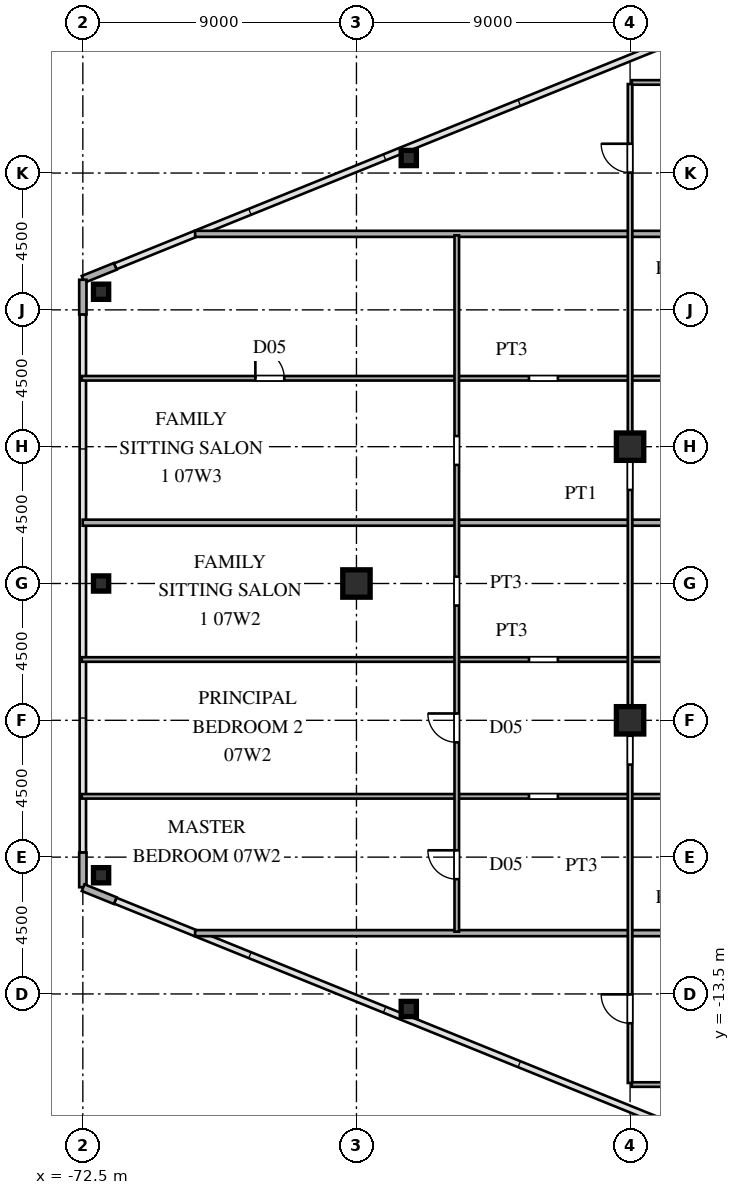
"""IFC4 building model, lengths in metres.
Left out: names, types, materials, properties, quantities, classifications, styles, units other than length and angle.
Written with IfcOpenShell. Run it as: python <this file> out.ifc"""

import sys

from ifc_helpers import new_model, si_unit, direction, frame, frame_2d, origin, origin_2d, place, context, subcontext, project, spatial, rectangle, hollow_rectangle, i_section, extrude, source, transform, mapped, element, fill, save


model = new_model("IFC4")
c1 = context("Model", 3, precision=1e-05, world=origin(), true_north=direction((0.0, 1.0)))
c2 = subcontext(c1, "Body", "Model", "MODEL_VIEW")
j1 = project(units=[si_unit("LENGTHUNIT", "METRE"), si_unit("PLANEANGLEUNIT", "RADIAN")], contexts=[c1])
p1 = place(None, origin())
s1 = spatial("IfcSite", under=j1, at=p1, CompositionType="ELEMENT")
p2 = place(p1, origin())
s2 = spatial("IfcBuilding", under=s1, at=p2, CompositionType="ELEMENT")
p3 = place(p2, frame((0.0, 0.0, 29.7)))
s3 = spatial("IfcBuildingStorey", under=s2, at=p3, CompositionType="ELEMENT", Elevation=29.7)
m1 = source(origin(), c2, "Body", "SweptSolid", [
    extrude(i_section(OverallWidth=0.9, OverallDepth=0.9, WebThickness=0.036, FlangeThickness=0.055, at=origin_2d()), origin(), (0.0, 0.0, 1.0), 3.6),
])
for number, where, z_axis, x_axis in (
    (1, (-54.5, -4.5, 0.0), (0.0, 0.0, 1.0), (1.0, 0.0, 0.0)),
    (2, (-54.5, 4.5, 0.0), (0.0, 0.0, 1.0), (1.0, 0.0, 0.0)),
    (3, (-63.5, 0.0, 0.0), (0.0, 0.0, 1.0), (1.0, 0.0, 0.0)),
):
    element("IfcColumn", number, at=place(p3, frame(where, z_axis=z_axis, x_axis=x_axis)), inside=s3, PredefinedType="COLUMN", context=c2, shape_type="MappedRepresentation", body=[
        mapped(m1, transform((0.0, 0.0, 0.0), scale=1.0)),
    ])
m2 = source(origin(), c2, "Body", "SweptSolid", [
    extrude(hollow_rectangle(XDim=0.5, YDim=0.5, WallThickness=0.02, at=origin_2d()), origin(), (0.0, 0.0, 1.0), 3.6),
])
for number, where, z_axis, x_axis in (
    (4, (-71.9, 9.596, 0.0), (0.0, 0.0, 1.0), (1.0, 0.0, 0.0)),
    (5, (-71.9, -9.596, 0.0), (0.0, 0.0, 1.0), (1.0, 0.0, 0.0)),
    (6, (-61.779, -13.994, 0.0), (0.0, 0.0, 1.0), (1.0, 0.0, 0.0)),
    (7, (-61.779, 13.994, 0.0), (0.0, 0.0, 1.0), (1.0, 0.0, 0.0)),
    (8, (-71.9, 0.0, 0.0), (0.0, 0.0, 1.0), (1.0, 0.0, 0.0)),
):
    element("IfcColumn", number, at=place(p3, frame(where, z_axis=z_axis, x_axis=x_axis)), inside=s3, PredefinedType="COLUMN", context=c2, shape_type="MappedRepresentation", body=[
        mapped(m2, transform((0.0, 0.0, 0.0), scale=1.0)),
    ])
for number, where, z_axis, x_axis in (
    (9, (-71.434, 10.431, 0.0), (0.0, 0.0, 1.0), (-0.927, -0.375, 0.0)),
    (10, (-72.5, 9.99, 0.0), (0.0, 0.0, 1.0), (0.0, -1.0, 0.0)),
    (11, (-72.5, -8.85, 0.0), (0.0, 0.0, 1.0), (0.0, -1.0, 0.0)),
    (12, (-72.491, -10.004, 0.0), (0.0, 0.0, 1.0), (0.927, -0.375, 0.0)),
):
    element("IfcWall", number, at=place(p3, frame(where, z_axis=z_axis, x_axis=x_axis)), inside=s3, PredefinedType="SOLIDWALL", context=c2, shape_type="SweptSolid", body=[
        extrude(rectangle(XDim=1.14, YDim=0.24, at=frame_2d((0.57, 0.0))), origin(), (0.0, 0.0, 1.0), 3.38),
    ])
p4 = place(p3, frame((-54.45, -16.48, 0.0), z_axis=(0.0, 0.0, 1.0), x_axis=(1.0, 0.0, 0.0)))
e13 = element("IfcWall", 13, at=p4, inside=s3, PredefinedType="PARTITIONING", context=c2, shape_type="SweptSolid", body=[
    extrude(rectangle(XDim=10.2, YDim=0.15, at=frame_2d((5.1, 0.0))), origin(), (0.0, 0.0, 1.0), 3.38),
])
p5 = place(p4, frame((4.625, 0.0, 0.0)))
e14 = element("IfcOpeningElement", 14, at=p5, cuts=e13, PredefinedType="OPENING", context=c2, shape_type="SweptSolid", body=[
    extrude(rectangle(XDim=0.95, YDim=2.15, at=frame_2d((0.475, 1.075))), frame((0.0, 0.085, 0.0), z_axis=(0.0, -1.0, 0.0), x_axis=(1.0, 0.0, 0.0)), (0.0, 0.0, 1.0), 0.17),
])
p6 = place(p3, frame((-68.807, -11.5, 0.0), z_axis=(0.0, 0.0, 1.0), x_axis=(1.0, 0.0, 0.0)))
e15 = element("IfcWall", 15, at=p6, inside=s3, PredefinedType="PARTITIONING", context=c2, shape_type="SweptSolid", body=[
    extrude(rectangle(XDim=29.077, YDim=0.2, at=frame_2d((14.539, 0.0))), origin(), (0.0, 0.0, 1.0), 3.38),
])
p7 = place(p3, frame((-72.535, -7.0, 0.0), z_axis=(0.0, 0.0, 1.0), x_axis=(1.0, 0.0, 0.0)))
e16 = element("IfcWall", 16, at=p7, inside=s3, PredefinedType="PARTITIONING", context=c2, shape_type="SweptSolid", body=[
    extrude(rectangle(XDim=28.285, YDim=0.15, at=frame_2d((14.143, 0.0))), origin(), (0.0, 0.0, 1.0), 3.38),
])
p8 = place(p7, frame((22.71, 0.0, 0.0)))
e17 = element("IfcOpeningElement", 17, at=p8, cuts=e16, PredefinedType="OPENING", context=c2, shape_type="SweptSolid", body=[
    extrude(rectangle(XDim=0.95, YDim=2.15, at=frame_2d((0.475, 1.075))), frame((0.0, 0.085, 0.0), z_axis=(0.0, -1.0, 0.0), x_axis=(1.0, 0.0, 0.0)), (0.0, 0.0, 1.0), 0.17),
])
p9 = place(p7, frame((14.71, 0.0, 0.0)))
e18 = element("IfcOpeningElement", 18, at=p9, cuts=e16, PredefinedType="OPENING", context=c2, shape_type="SweptSolid", body=[
    extrude(rectangle(XDim=0.95, YDim=2.15, at=frame_2d((0.475, 1.075))), frame((0.0, 0.085, 0.0), z_axis=(0.0, -1.0, 0.0), x_axis=(1.0, 0.0, 0.0)), (0.0, 0.0, 1.0), 0.17),
])
p10 = place(p3, frame((-72.535, -2.5, 0.0), z_axis=(0.0, 0.0, 1.0), x_axis=(1.0, 0.0, 0.0)))
e19 = element("IfcWall", 19, at=p10, inside=s3, PredefinedType="PARTITIONING", context=c2, shape_type="SweptSolid", body=[
    extrude(rectangle(XDim=28.285, YDim=0.15, at=frame_2d((14.143, 0.0))), origin(), (0.0, 0.0, 1.0), 3.38),
])
p11 = place(p10, frame((22.71, 0.0, 0.0)))
e20 = element("IfcOpeningElement", 20, at=p11, cuts=e19, PredefinedType="OPENING", context=c2, shape_type="SweptSolid", body=[
    extrude(rectangle(XDim=0.95, YDim=2.15, at=frame_2d((0.475, 1.075))), frame((0.0, 0.085, 0.0), z_axis=(0.0, -1.0, 0.0), x_axis=(1.0, 0.0, 0.0)), (0.0, 0.0, 1.0), 0.17),
])
p12 = place(p10, frame((14.71, 0.0, 0.0)))
e21 = element("IfcOpeningElement", 21, at=p12, cuts=e19, PredefinedType="OPENING", context=c2, shape_type="SweptSolid", body=[
    extrude(rectangle(XDim=0.95, YDim=2.15, at=frame_2d((0.475, 1.075))), frame((0.0, 0.085, 0.0), z_axis=(0.0, -1.0, 0.0), x_axis=(1.0, 0.0, 0.0)), (0.0, 0.0, 1.0), 0.17),
])
p13 = place(p3, frame((-72.505, 2.0, 0.0), z_axis=(0.0, 0.0, 1.0), x_axis=(1.0, 0.0, 0.0)))
e22 = element("IfcWall", 22, at=p13, inside=s3, PredefinedType="PARTITIONING", context=c2, shape_type="SweptSolid", body=[
    extrude(rectangle(XDim=32.775, YDim=0.2, at=frame_2d((16.387, 0.0))), origin(), (0.0, 0.0, 1.0), 3.38),
])
p14 = place(p3, frame((-72.535, 6.75, 0.0), z_axis=(0.0, 0.0, 1.0), x_axis=(1.0, 0.0, 0.0)))
e23 = element("IfcWall", 23, at=p14, inside=s3, PredefinedType="PARTITIONING", context=c2, shape_type="SweptSolid", body=[
    extrude(rectangle(XDim=28.285, YDim=0.15, at=frame_2d((14.143, 0.0))), origin(), (0.0, 0.0, 1.0), 3.38),
])
p15 = place(p14, frame((5.71, 0.0, 0.0)))
e24 = element("IfcOpeningElement", 24, at=p15, cuts=e23, PredefinedType="OPENING", context=c2, shape_type="SweptSolid", body=[
    extrude(rectangle(XDim=0.95, YDim=2.15, at=frame_2d((0.475, 1.075))), frame((0.0, 0.085, 0.0), z_axis=(0.0, -1.0, 0.0), x_axis=(1.0, 0.0, 0.0)), (0.0, 0.0, 1.0), 0.17),
])
p16 = place(p14, frame((14.71, 0.0, 0.0)))
e25 = element("IfcOpeningElement", 25, at=p16, cuts=e23, PredefinedType="OPENING", context=c2, shape_type="SweptSolid", body=[
    extrude(rectangle(XDim=0.95, YDim=2.15, at=frame_2d((0.475, 1.075))), frame((0.0, 0.085, 0.0), z_axis=(0.0, -1.0, 0.0), x_axis=(1.0, 0.0, 0.0)), (0.0, 0.0, 1.0), 0.17),
])
p17 = place(p3, frame((-68.807, 11.5, 0.0), z_axis=(0.0, 0.0, 1.0), x_axis=(1.0, 0.0, 0.0)))
e26 = element("IfcWall", 26, at=p17, inside=s3, PredefinedType="PARTITIONING", context=c2, shape_type="SweptSolid", body=[
    extrude(rectangle(XDim=29.077, YDim=0.2, at=frame_2d((14.539, 0.0))), origin(), (0.0, 0.0, 1.0), 3.38),
])
p18 = place(p3, frame((-54.45, 16.48, 0.0), z_axis=(0.0, 0.0, 1.0), x_axis=(1.0, 0.0, 0.0)))
e27 = element("IfcWall", 27, at=p18, inside=s3, PredefinedType="PARTITIONING", context=c2, shape_type="SweptSolid", body=[
    extrude(rectangle(XDim=10.2, YDim=0.15, at=frame_2d((5.1, 0.0))), origin(), (0.0, 0.0, 1.0), 3.38),
])
p19 = place(p18, frame((4.625, 0.0, 0.0)))
e28 = element("IfcOpeningElement", 28, at=p19, cuts=e27, PredefinedType="OPENING", context=c2, shape_type="SweptSolid", body=[
    extrude(rectangle(XDim=0.95, YDim=2.15, at=frame_2d((0.475, 1.075))), frame((0.0, 0.085, 0.0), z_axis=(0.0, -1.0, 0.0), x_axis=(1.0, 0.0, 0.0)), (0.0, 0.0, 1.0), 0.17),
])
p20 = place(p3, frame((-60.2, -11.45, 0.0), z_axis=(0.0, 0.0, 1.0), x_axis=(0.0, 1.0, 0.0)))
e29 = element("IfcWall", 29, at=p20, inside=s3, PredefinedType="PARTITIONING", context=c2, shape_type="SweptSolid", body=[
    extrude(rectangle(XDim=22.9, YDim=0.15, at=frame_2d((11.45, 0.0))), origin(), (0.0, 0.0, 1.0), 3.38),
])
p21 = place(p20, frame((1.725, 0.0, 0.0)))
e30 = element("IfcOpeningElement", 30, at=p21, cuts=e29, PredefinedType="OPENING", context=c2, shape_type="SweptSolid", body=[
    extrude(rectangle(XDim=0.95, YDim=2.15, at=frame_2d((0.475, 1.075))), frame((0.0, 0.085, 0.0), z_axis=(0.0, -1.0, 0.0), x_axis=(1.0, 0.0, 0.0)), (0.0, 0.0, 1.0), 0.17),
])
p22 = place(p20, frame((6.225, 0.0, 0.0)))
e31 = element("IfcOpeningElement", 31, at=p22, cuts=e29, PredefinedType="OPENING", context=c2, shape_type="SweptSolid", body=[
    extrude(rectangle(XDim=0.95, YDim=2.15, at=frame_2d((0.475, 1.075))), frame((0.0, 0.085, 0.0), z_axis=(0.0, -1.0, 0.0), x_axis=(1.0, 0.0, 0.0)), (0.0, 0.0, 1.0), 0.17),
])
p23 = place(p20, frame((10.725, 0.0, 0.0)))
e32 = element("IfcOpeningElement", 32, at=p23, cuts=e29, PredefinedType="OPENING", context=c2, shape_type="SweptSolid", body=[
    extrude(rectangle(XDim=0.95, YDim=2.15, at=frame_2d((0.475, 1.075))), frame((0.0, 0.085, 0.0), z_axis=(0.0, -1.0, 0.0), x_axis=(1.0, 0.0, 0.0)), (0.0, 0.0, 1.0), 0.17),
])
p24 = place(p20, frame((15.35, 0.0, 0.0)))
e33 = element("IfcOpeningElement", 33, at=p24, cuts=e29, PredefinedType="OPENING", context=c2, shape_type="SweptSolid", body=[
    extrude(rectangle(XDim=0.95, YDim=2.15, at=frame_2d((0.475, 1.075))), frame((0.0, 0.085, 0.0), z_axis=(0.0, -1.0, 0.0), x_axis=(1.0, 0.0, 0.0)), (0.0, 0.0, 1.0), 0.17),
])
p25 = place(p3, frame((-54.5, -16.427, 0.0), z_axis=(0.0, 0.0, 1.0), x_axis=(0.0, 1.0, 0.0)))
e34 = element("IfcWall", 34, at=p25, inside=s3, PredefinedType="PARTITIONING", context=c2, shape_type="SweptSolid", body=[
    extrude(rectangle(XDim=32.854, YDim=0.15, at=frame_2d((16.427, 0.0))), origin(), (0.0, 0.0, 1.0), 2.68),
])
p26 = place(p25, frame((1.963, 0.0, 0.0)))
e35 = element("IfcOpeningElement", 35, at=p26, cuts=e34, PredefinedType="OPENING", context=c2, shape_type="SweptSolid", body=[
    extrude(rectangle(XDim=0.95, YDim=2.15, at=frame_2d((0.475, 1.075))), frame((0.0, 0.085, 0.0), z_axis=(0.0, -1.0, 0.0), x_axis=(1.0, 0.0, 0.0)), (0.0, 0.0, 1.0), 0.17),
])
p27 = place(p25, frame((10.47, 0.0, 0.0)))
e36 = element("IfcOpeningElement", 36, at=p27, cuts=e34, PredefinedType="OPENING", context=c2, shape_type="SweptSolid", body=[
    extrude(rectangle(XDim=0.95, YDim=2.15, at=frame_2d((0.475, 1.075))), frame((0.0, 0.085, 0.0), z_axis=(0.0, -1.0, 0.0), x_axis=(1.0, 0.0, 0.0)), (0.0, 0.0, 1.0), 0.17),
])
p28 = place(p25, frame((19.504, 0.0, 0.0)))
e37 = element("IfcOpeningElement", 37, at=p28, cuts=e34, PredefinedType="OPENING", context=c2, shape_type="SweptSolid", body=[
    extrude(rectangle(XDim=0.95, YDim=2.15, at=frame_2d((0.475, 1.075))), frame((0.0, 0.085, 0.0), z_axis=(0.0, -1.0, 0.0), x_axis=(1.0, 0.0, 0.0)), (0.0, 0.0, 1.0), 0.17),
])
p29 = place(p25, frame((29.941, 0.0, 0.0)))
e38 = element("IfcOpeningElement", 38, at=p29, cuts=e34, PredefinedType="OPENING", context=c2, shape_type="SweptSolid", body=[
    extrude(rectangle(XDim=0.95, YDim=2.15, at=frame_2d((0.475, 1.075))), frame((0.0, 0.085, 0.0), z_axis=(0.0, -1.0, 0.0), x_axis=(1.0, 0.0, 0.0)), (0.0, 0.0, 1.0), 0.17),
])
m3 = source(origin(), c2, "Body", "SweptSolid", [
    extrude(rectangle(XDim=0.95, YDim=2.15, at=frame_2d((0.475, 1.075))), frame((0.0, 0.025, 0.0), z_axis=(0.0, -1.0, 0.0), x_axis=(1.0, 0.0, 0.0)), (0.0, 0.0, 1.0), 0.05),
])
p30 = place(p15, origin())
e39 = element("IfcDoor", 39, at=p30, inside=s3, OperationType="SINGLE_SWING_LEFT", PredefinedType="DOOR", context=c2, shape_type="MappedRepresentation", body=[
    mapped(m3, transform((0.0, 0.0, 0.0), scale=1.0)),
])
fill(e24, e39)
p31 = place(p21, origin())
e40 = element("IfcDoor", 40, at=p31, inside=s3, OperationType="SINGLE_SWING_RIGHT", PredefinedType="DOOR", context=c2, shape_type="MappedRepresentation", body=[
    mapped(m3, transform((0.0, 0.0, 0.0), scale=1.0)),
])
fill(e30, e40)
p32 = place(p22, origin())
e41 = element("IfcDoor", 41, at=p32, inside=s3, OperationType="SINGLE_SWING_RIGHT", PredefinedType="DOOR", context=c2, shape_type="MappedRepresentation", body=[
    mapped(m3, transform((0.0, 0.0, 0.0), scale=1.0)),
])
fill(e31, e41)
p33 = place(p26, origin())
e42 = element("IfcDoor", 42, at=p33, inside=s3, OperationType="SINGLE_SWING_RIGHT", PredefinedType="DOOR", context=c2, shape_type="MappedRepresentation", body=[
    mapped(m3, transform((0.0, 0.0, 0.0), scale=1.0)),
])
fill(e35, e42)
p34 = place(p29, origin())
e43 = element("IfcDoor", 43, at=p34, inside=s3, OperationType="SINGLE_SWING_RIGHT", PredefinedType="DOOR", context=c2, shape_type="MappedRepresentation", body=[
    mapped(m3, transform((0.0, 0.0, 0.0), scale=1.0)),
])
fill(e38, e43)
save(model, sys.argv[1])
